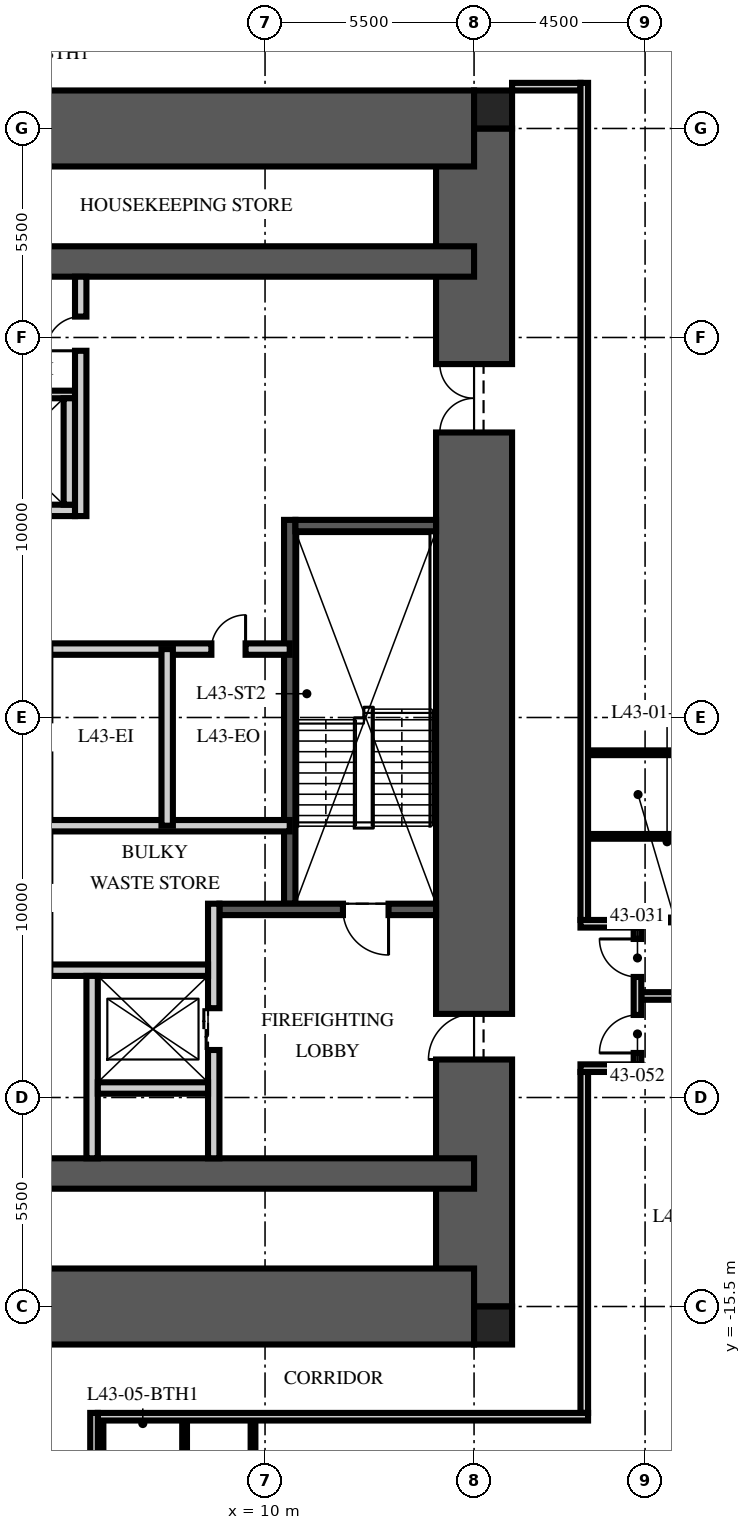
"""IFC4 building model, lengths in metres.
Left out: names, types, materials, properties, quantities, classifications, styles, units other than length and angle.
Written with IfcOpenShell. Run it as: python <this file> out.ifc"""

import sys

from ifc_helpers import new_model, si_unit, direction, frame, frame_2d, origin, origin_2d, place, context, subcontext, project, spatial, rectangle, extrude, element, fill, save


model = new_model("IFC4")
c1 = context("Model", 3, precision=1e-05, world=origin(), true_north=direction((0.0, 1.0)))
c2 = subcontext(c1, "Body", "Model", "MODEL_VIEW")
j1 = project(units=[si_unit("LENGTHUNIT", "METRE"), si_unit("PLANEANGLEUNIT", "RADIAN")], contexts=[c1])
p1 = place(None, origin())
s1 = spatial("IfcSite", under=j1, at=p1, CompositionType="ELEMENT")
p2 = place(p1, origin())
s2 = spatial("IfcBuilding", under=s1, at=p2, CompositionType="ELEMENT")
p3 = place(p2, frame((0.0, 0.0, 171.0)))
s3 = spatial("IfcBuildingStorey", under=s2, at=p3, CompositionType="ELEMENT", Elevation=171.0)
p4 = place(p3, frame((15.5, -15.5, -0.25), z_axis=(0.0, 0.0, 1.0), x_axis=(0.0, 1.0, 0.0)))
e1 = element("IfcWall", 1, at=p4, inside=s3, PredefinedType="SHEAR", context=c2, shape_type="SweptSolid", body=[
    extrude(rectangle(XDim=31.0, YDim=2.0, at=frame_2d((15.5, 0.0))), origin(), (0.0, 0.0, 1.0), 3.75),
])
p5 = place(p4, frame((6.5, 0.0, 0.25)))
e2 = element("IfcOpeningElement", 2, at=p5, cuts=e1, PredefinedType="OPENING", context=c2, shape_type="SweptSolid", body=[
    extrude(rectangle(XDim=1.2, YDim=2.1, at=frame_2d((0.6, 1.05))), frame((0.0, 1.01, 0.0), z_axis=(0.0, -1.0, 0.0), x_axis=(1.0, 0.0, 0.0)), (0.0, 0.0, 1.0), 2.02),
])
p6 = place(p4, frame((23.0, 0.0, 0.25)))
e3 = element("IfcOpeningElement", 3, at=p6, cuts=e1, PredefinedType="OPENING", context=c2, shape_type="SweptSolid", body=[
    extrude(rectangle(XDim=1.8, YDim=2.1, at=frame_2d((0.9, 1.05))), frame((0.0, 1.01, 0.0), z_axis=(0.0, -1.0, 0.0), x_axis=(1.0, 0.0, 0.0)), (0.0, 0.0, 1.0), 2.02),
])
p7 = place(p3, frame((-15.5, 15.5, -0.25), z_axis=(0.0, 0.0, 1.0), x_axis=(1.0, 0.0, 0.0)))
e4 = element("IfcWall", 4, at=p7, inside=s3, PredefinedType="SHEAR", context=c2, shape_type="SweptSolid", body=[
    extrude(rectangle(XDim=31.0, YDim=2.0, at=frame_2d((15.5, 0.0))), origin(), (0.0, 0.0, 1.0), 3.75),
])
p8 = place(p7, frame((5.0, 0.0, 0.25)))
e5 = element("IfcOpeningElement", 5, at=p8, cuts=e4, PredefinedType="OPENING", context=c2, shape_type="SweptSolid", body=[
    extrude(rectangle(XDim=1.0, YDim=2.1, at=frame_2d((0.5, 1.05))), frame((0.0, 1.01, 0.0), z_axis=(0.0, -1.0, 0.0), x_axis=(1.0, 0.0, 0.0)), (0.0, 0.0, 1.0), 2.02),
])
p9 = place(p3, frame((-15.5, -15.5, -0.25), z_axis=(0.0, 0.0, 1.0), x_axis=(1.0, 0.0, 0.0)))
e6 = element("IfcWall", 6, at=p9, inside=s3, PredefinedType="SHEAR", context=c2, shape_type="SweptSolid", body=[
    extrude(rectangle(XDim=31.0, YDim=2.0, at=frame_2d((15.5, 0.0))), origin(), (0.0, 0.0, 1.0), 3.75),
])
p10 = place(p9, frame((10.4, 0.0, 0.25)))
e7 = element("IfcOpeningElement", 7, at=p10, cuts=e6, PredefinedType="OPENING", context=c2, shape_type="SweptSolid", body=[
    extrude(rectangle(XDim=1.1, YDim=2.1, at=frame_2d((0.55, 1.05))), frame((0.0, 1.01, 0.0), z_axis=(0.0, -1.0, 0.0), x_axis=(1.0, 0.0, 0.0)), (0.0, 0.0, 1.0), 2.02),
])
p11 = place(p9, frame((13.5, 0.0, 0.25)))
e8 = element("IfcOpeningElement", 8, at=p11, cuts=e6, PredefinedType="OPENING", context=c2, shape_type="SweptSolid", body=[
    extrude(rectangle(XDim=1.1, YDim=2.1, at=frame_2d((0.55, 1.05))), frame((0.0, 1.01, 0.0), z_axis=(0.0, -1.0, 0.0), x_axis=(1.0, 0.0, 0.0)), (0.0, 0.0, 1.0), 2.02),
])
p12 = place(p9, frame((16.6, 0.0, 0.25)))
e9 = element("IfcOpeningElement", 9, at=p12, cuts=e6, PredefinedType="OPENING", context=c2, shape_type="SweptSolid", body=[
    extrude(rectangle(XDim=1.1, YDim=2.1, at=frame_2d((0.55, 1.05))), frame((0.0, 1.01, 0.0), z_axis=(0.0, -1.0, 0.0), x_axis=(1.0, 0.0, 0.0)), (0.0, 0.0, 1.0), 2.02),
])
for number, where, z_axis, x_axis in (
    (10, (-15.5, 12.0, -0.25), (0.0, 0.0, 1.0), (1.0, 0.0, 0.0)),
    (11, (-15.5, -12.0, -0.25), (0.0, 0.0, 1.0), (1.0, 0.0, 0.0)),
):
    element("IfcWall", number, at=place(p3, frame(where, z_axis=z_axis, x_axis=x_axis)), inside=s3, PredefinedType="SHEAR", context=c2, shape_type="SweptSolid", body=[
        extrude(rectangle(XDim=31.0, YDim=0.8, at=frame_2d((15.5, 0.0))), origin(), (0.0, 0.0, 1.0), 3.75),
    ])
for number, where, z_axis, x_axis in (
    (12, (16.0, 16.0, -0.25), (0.0, 0.0, 1.0), (1.0, 0.0, 0.0)),
    (13, (16.0, -16.0, -0.25), (0.0, 0.0, 1.0), (1.0, 0.0, 0.0)),
):
    element("IfcColumn", number, at=place(p3, frame(where, z_axis=z_axis, x_axis=x_axis)), inside=s3, PredefinedType="COLUMN", context=c2, shape_type="SweptSolid", body=[
        extrude(rectangle(XDim=1.0, YDim=1.0, at=origin_2d()), origin(), (0.0, 0.0, 1.0), 3.75),
    ])
p13 = place(p3, frame((10.65, -4.9, 0.0), z_axis=(0.0, 0.0, 1.0), x_axis=(0.0, 1.0, 0.0)))
e14 = element("IfcWall", 14, at=p13, inside=s3, PredefinedType="SOLIDWALL", context=c2, shape_type="SweptSolid", body=[
    extrude(rectangle(XDim=10.1, YDim=0.3, at=frame_2d((5.05, 0.0))), origin(), (0.0, 0.0, 1.0), 3.5),
])
p14 = place(p3, frame((14.5, -5.05, 0.0), z_axis=(0.0, 0.0, 1.0), x_axis=(-1.0, 0.0, 0.0)))
e15 = element("IfcWall", 15, at=p14, inside=s3, PredefinedType="SOLIDWALL", context=c2, shape_type="SweptSolid", body=[
    extrude(rectangle(XDim=5.7, YDim=0.3, at=frame_2d((2.85, 0.0))), origin(), (0.0, 0.0, 1.0), 3.5),
])
p15 = place(p14, frame((1.25, 0.0, 0.0)))
e16 = element("IfcOpeningElement", 16, at=p15, cuts=e15, PredefinedType="OPENING", context=c2, shape_type="SweptSolid", body=[
    extrude(rectangle(XDim=1.2, YDim=2.1, at=frame_2d((0.6, 1.05))), frame((0.0, 0.16, 0.0), z_axis=(0.0, -1.0, 0.0), x_axis=(1.0, 0.0, 0.0)), (0.0, 0.0, 1.0), 0.32),
])
p16 = place(p3, frame((14.5, 5.05, 0.0), z_axis=(0.0, 0.0, 1.0), x_axis=(-1.0, 0.0, 0.0)))
e17 = element("IfcWall", 17, at=p16, inside=s3, PredefinedType="SOLIDWALL", context=c2, shape_type="SweptSolid", body=[
    extrude(rectangle(XDim=3.7, YDim=0.3, at=frame_2d((1.85, 0.0))), origin(), (0.0, 0.0, 1.0), 3.5),
])
p17 = place(p3, frame((8.65, -11.6, 0.0), z_axis=(0.0, 0.0, 1.0), x_axis=(0.0, 1.0, 0.0)))
e18 = element("IfcWall", 18, at=p17, inside=s3, PredefinedType="PARTITIONING", context=c2, shape_type="SweptSolid", body=[
    extrude(rectangle(XDim=6.7, YDim=0.3, at=frame_2d((3.35, 0.0))), origin(), (0.0, 0.0, 1.0), 3.5),
])
p18 = place(p17, frame((2.85, 0.0, 0.0)))
e19 = element("IfcOpeningElement", 19, at=p18, cuts=e18, PredefinedType="OPENING", context=c2, shape_type="SweptSolid", body=[
    extrude(rectangle(XDim=1.1, YDim=2.1, at=frame_2d((0.55, 1.05))), frame((0.0, 0.16, 0.0), z_axis=(0.0, -1.0, 0.0), x_axis=(1.0, 0.0, 0.0)), (0.0, 0.0, 1.0), 0.32),
])
p19 = place(p3, frame((-8.5, -6.65, 0.0), z_axis=(0.0, 0.0, 1.0), x_axis=(1.0, 0.0, 0.0)))
e20 = element("IfcWall", 20, at=p19, inside=s3, PredefinedType="PARTITIONING", context=c2, shape_type="SweptSolid", body=[
    extrude(rectangle(XDim=17.0, YDim=0.3, at=frame_2d((8.5, 0.0))), origin(), (0.0, 0.0, 1.0), 3.5),
])
p20 = place(p19, frame((7.8, 0.0, 0.0)))
e21 = element("IfcOpeningElement", 21, at=p20, cuts=e20, PredefinedType="OPENING", context=c2, shape_type="SweptSolid", body=[
    extrude(rectangle(XDim=1.3, YDim=2.4, at=frame_2d((0.65, 1.2))), frame((0.0, 0.16, 0.0), z_axis=(0.0, -1.0, 0.0), x_axis=(1.0, 0.0, 0.0)), (0.0, 0.0, 1.0), 0.32),
])
p21 = place(p19, frame((5.65, 0.0, 0.0)))
e22 = element("IfcOpeningElement", 22, at=p21, cuts=e20, PredefinedType="OPENING", context=c2, shape_type="SweptSolid", body=[
    extrude(rectangle(XDim=0.9, YDim=2.1, at=frame_2d((0.45, 1.05))), frame((0.0, 0.16, 0.0), z_axis=(0.0, -1.0, 0.0), x_axis=(1.0, 0.0, 0.0)), (0.0, 0.0, 1.0), 0.32),
])
p22 = place(p19, frame((10.4, 0.0, 0.0)))
e23 = element("IfcOpeningElement", 23, at=p22, cuts=e20, PredefinedType="OPENING", context=c2, shape_type="SweptSolid", body=[
    extrude(rectangle(XDim=0.9, YDim=2.1, at=frame_2d((0.45, 1.05))), frame((0.0, 0.16, 0.0), z_axis=(0.0, -1.0, 0.0), x_axis=(1.0, 0.0, 0.0)), (0.0, 0.0, 1.0), 0.32),
])
p23 = place(p3, frame((5.45, -11.6, 0.0), z_axis=(0.0, 0.0, 1.0), x_axis=(0.0, 1.0, 0.0)))
e24 = element("IfcWall", 24, at=p23, inside=s3, PredefinedType="PARTITIONING", context=c2, shape_type="SweptSolid", body=[
    extrude(rectangle(XDim=4.8, YDim=0.3, at=frame_2d((2.4, 0.0))), origin(), (0.0, 0.0, 1.0), 3.5),
])
p24 = place(p3, frame((5.6, -9.75, 0.0), z_axis=(0.0, 0.0, 1.0), x_axis=(1.0, 0.0, 0.0)))
e25 = element("IfcWall", 25, at=p24, inside=s3, PredefinedType="PARTITIONING", context=c2, shape_type="SweptSolid", body=[
    extrude(rectangle(XDim=2.9, YDim=0.3, at=frame_2d((1.45, 0.0))), origin(), (0.0, 0.0, 1.0), 3.5),
])
p25 = place(p3, frame((-4.7, 5.45, 0.0), z_axis=(0.0, 0.0, 1.0), x_axis=(1.0, 0.0, 0.0)))
e26 = element("IfcWall", 26, at=p25, inside=s3, PredefinedType="PARTITIONING", context=c2, shape_type="SweptSolid", body=[
    extrude(rectangle(XDim=9.7, YDim=0.3, at=frame_2d((4.85, 0.0))), origin(), (0.0, 0.0, 1.0), 3.5),
])
p26 = place(p3, frame((-4.7, 8.5, 0.0), z_axis=(0.0, 0.0, 1.0), x_axis=(1.0, 0.0, 0.0)))
e27 = element("IfcWall", 27, at=p26, inside=s3, PredefinedType="PARTITIONING", context=c2, shape_type="SweptSolid", body=[
    extrude(rectangle(XDim=9.7, YDim=0.2, at=frame_2d((4.85, 0.0))), origin(), (0.0, 0.0, 1.0), 3.5),
])
p27 = place(p3, frame((4.85, 5.6, 0.0), z_axis=(0.0, 0.0, 1.0), x_axis=(0.0, 1.0, 0.0)))
e28 = element("IfcWall", 28, at=p27, inside=s3, PredefinedType="PARTITIONING", context=c2, shape_type="SweptSolid", body=[
    extrude(rectangle(XDim=2.8, YDim=0.3, at=frame_2d((1.4, 0.0))), origin(), (0.0, 0.0, 1.0), 3.5),
])
p28 = place(p3, frame((-10.65, 1.8, 0.0), z_axis=(0.0, 0.0, 1.0), x_axis=(1.0, 0.0, 0.0)))
e29 = element("IfcWall", 29, at=p28, inside=s3, PredefinedType="PARTITIONING", context=c2, shape_type="SweptSolid", body=[
    extrude(rectangle(XDim=21.3, YDim=0.3, at=frame_2d((10.65, 0.0))), origin(), (0.0, 0.0, 1.0), 3.5),
])
p29 = place(p28, frame((10.05, 0.0, 0.0)))
e30 = element("IfcOpeningElement", 30, at=p29, cuts=e29, PredefinedType="OPENING", context=c2, shape_type="SweptSolid", body=[
    extrude(rectangle(XDim=1.2, YDim=2.1, at=frame_2d((0.6, 1.05))), frame((0.0, 0.16, 0.0), z_axis=(0.0, -1.0, 0.0), x_axis=(1.0, 0.0, 0.0)), (0.0, 0.0, 1.0), 0.32),
])
p30 = place(p28, frame((19.238, 0.0, 0.0)))
e31 = element("IfcOpeningElement", 31, at=p30, cuts=e29, PredefinedType="OPENING", context=c2, shape_type="SweptSolid", body=[
    extrude(rectangle(XDim=0.9, YDim=2.1, at=frame_2d((0.45, 1.05))), frame((0.0, 0.16, 0.0), z_axis=(0.0, -1.0, 0.0), x_axis=(1.0, 0.0, 0.0)), (0.0, 0.0, 1.0), 0.32),
])
p31 = place(p3, frame((10.65, -2.848, 0.0), z_axis=(0.0, 0.0, 1.0), x_axis=(-1.0, 0.0, 0.0)))
e32 = element("IfcWall", 32, at=p31, inside=s3, PredefinedType="PARTITIONING", context=c2, shape_type="SweptSolid", body=[
    extrude(rectangle(XDim=6.45, YDim=0.3, at=frame_2d((3.225, 0.0))), origin(), (0.0, 0.0, 1.0), 3.5),
])
p32 = place(p3, frame((7.425, -2.848, 0.0), z_axis=(0.0, 0.0, 1.0), x_axis=(0.0, 1.0, 0.0)))
e33 = element("IfcWall", 33, at=p32, inside=s3, PredefinedType="PARTITIONING", context=c2, shape_type="SweptSolid", body=[
    extrude(rectangle(XDim=4.648, YDim=0.3, at=frame_2d((2.324, 0.0))), origin(), (0.0, 0.0, 1.0), 3.5),
])
p33 = place(p3, frame((5.15, 5.3, 0.0), z_axis=(0.0, 0.0, 1.0), x_axis=(0.0, 1.0, 0.0)))
e34 = element("IfcWall", 34, at=p33, inside=s3, PredefinedType="PARTITIONING", context=c2, shape_type="SweptSolid", body=[
    extrude(rectangle(XDim=6.3, YDim=0.3, at=frame_2d((3.15, 0.0))), origin(), (0.0, 0.0, 1.0), 3.5),
])
p34 = place(p33, frame((4.35, 0.0, 0.0)))
e35 = element("IfcOpeningElement", 35, at=p34, cuts=e34, PredefinedType="OPENING", context=c2, shape_type="SweptSolid", body=[
    extrude(rectangle(XDim=0.9, YDim=2.1, at=frame_2d((0.45, 1.05))), frame((0.0, 0.16, 0.0), z_axis=(0.0, -1.0, 0.0), x_axis=(1.0, 0.0, 0.0)), (0.0, 0.0, 1.0), 0.32),
])
p35 = place(p3, frame((16.5, 16.6, 0.0), z_axis=(0.0, 0.0, 1.0), x_axis=(1.0, 0.0, 0.0)))
e36 = element("IfcWall", 36, at=p35, inside=s3, PredefinedType="PARTITIONING", context=c2, shape_type="SweptSolid", body=[
    extrude(rectangle(XDim=1.8, YDim=0.2, at=frame_2d((0.9, 0.0))), origin(), (0.0, 0.0, 1.0), 2.3),
])
p36 = place(p3, frame((19.9, -7.328, 0.0), z_axis=(0.0, 0.0, 1.0), x_axis=(1.0, 0.0, 0.0)))
e37 = element("IfcWall", 37, at=p36, inside=s3, PredefinedType="PARTITIONING", context=c2, shape_type="SweptSolid", body=[
    extrude(rectangle(XDim=8.25, YDim=0.2, at=frame_2d((4.125, 0.0))), origin(), (0.0, 0.0, 1.0), 2.81),
])
p37 = place(p3, frame((19.97, -5.328, 0.0), z_axis=(0.0, 0.0, 1.0), x_axis=(1.0, 0.0, 0.0)))
e38 = element("IfcWall", 38, at=p37, inside=s3, PredefinedType="PARTITIONING", context=c2, shape_type="SweptSolid", body=[
    extrude(rectangle(XDim=2.06, YDim=0.125, at=frame_2d((1.03, 0.0))), origin(), (0.0, 0.0, 1.0), 3.5),
])
for number, where, z_axis, x_axis in (
    (39, (18.5, -3.128, 0.0), (0.0, 0.0, 1.0), (1.0, 0.0, 0.0)),
    (40, (18.5, -0.928, 0.0), (0.0, 0.0, 1.0), (1.0, 0.0, 0.0)),
):
    element("IfcWall", number, at=place(p3, frame(where, z_axis=z_axis, x_axis=x_axis)), inside=s3, PredefinedType="PARTITIONING", context=c2, shape_type="SweptSolid", body=[
        extrude(rectangle(XDim=3.53, YDim=0.125, at=frame_2d((1.765, 0.0))), origin(), (0.0, 0.0, 1.0), 3.5),
    ])
for number, where, z_axis, x_axis in (
    (41, (5.684, -18.5, 0.0), (0.0, 0.0, 1.0), (0.0, -1.0, 0.0)),
    (42, (7.884, -18.5, 0.0), (0.0, 0.0, 1.0), (0.0, -1.0, 0.0)),
    (43, (9.684, -18.5, 0.0), (0.0, 0.0, 1.0), (0.0, -1.0, 0.0)),
):
    element("IfcWall", number, at=place(p3, frame(where, z_axis=z_axis, x_axis=x_axis)), inside=s3, PredefinedType="PARTITIONING", context=c2, shape_type="SweptSolid", body=[
        extrude(rectangle(XDim=3.95, YDim=0.125, at=frame_2d((1.975, 0.0))), origin(), (0.0, 0.0, 1.0), 3.5),
    ])
p38 = place(p3, frame((18.4, -18.3, 0.0), z_axis=(0.0, 0.0, 1.0), x_axis=(0.0, 1.0, 0.0)))
e44 = element("IfcWall", 44, at=p38, inside=s3, PredefinedType="PARTITIONING", context=c2, shape_type="SweptSolid", body=[
    extrude(rectangle(XDim=8.972, YDim=0.2, at=frame_2d((4.486, 0.0))), origin(), (0.0, 0.0, 1.0), 2.3),
])
p39 = place(p3, frame((18.3, -9.228, 0.0), z_axis=(0.0, 0.0, 1.0), x_axis=(1.0, 0.0, 0.0)))
e45 = element("IfcWall", 45, at=p39, inside=s3, PredefinedType="PARTITIONING", context=c2, shape_type="SweptSolid", body=[
    extrude(rectangle(XDim=1.6, YDim=0.2, at=frame_2d((0.8, 0.0))), origin(), (0.0, 0.0, 1.0), 2.7),
])
p40 = place(p3, frame((18.3, -5.428, 0.0), z_axis=(0.0, 0.0, 1.0), x_axis=(1.0, 0.0, 0.0)))
e46 = element("IfcWall", 46, at=p40, inside=s3, PredefinedType="PARTITIONING", context=c2, shape_type="SweptSolid", body=[
    extrude(rectangle(XDim=1.6, YDim=0.2, at=frame_2d((0.8, 0.0))), origin(), (0.0, 0.0, 1.0), 3.5),
])
p41 = place(p3, frame((19.8, -9.128, 0.0), z_axis=(0.0, 0.0, 1.0), x_axis=(0.0, 1.0, 0.0)))
e47 = element("IfcWall", 47, at=p41, inside=s3, PredefinedType="PARTITIONING", context=c2, shape_type="SweptSolid", body=[
    extrude(rectangle(XDim=3.6, YDim=0.2, at=frame_2d((1.8, 0.0))), origin(), (0.0, 0.0, 1.0), 2.7),
])
p42 = place(p41, frame((2.3, 0.0, 0.0)))
e48 = element("IfcOpeningElement", 48, at=p42, cuts=e47, PredefinedType="OPENING", context=c2, shape_type="SweptSolid", body=[
    extrude(rectangle(XDim=1.0, YDim=2.2, at=frame_2d((0.5, 1.1))), frame((0.0, 0.11, 0.0), z_axis=(0.0, -1.0, 0.0), x_axis=(1.0, 0.0, 0.0)), (0.0, 0.0, 1.0), 0.22),
])
p43 = place(p41, frame((0.3, 0.0, 0.0)))
e49 = element("IfcOpeningElement", 49, at=p43, cuts=e47, PredefinedType="OPENING", context=c2, shape_type="SweptSolid", body=[
    extrude(rectangle(XDim=1.0, YDim=2.2, at=frame_2d((0.5, 1.1))), frame((0.0, 0.11, 0.0), z_axis=(0.0, -1.0, 0.0), x_axis=(1.0, 0.0, 0.0)), (0.0, 0.0, 1.0), 0.22),
])
p44 = place(p3, frame((18.4, -5.328, 0.0), z_axis=(0.0, 0.0, 1.0), x_axis=(0.0, 1.0, 0.0)))
e50 = element("IfcWall", 50, at=p44, inside=s3, PredefinedType="PARTITIONING", context=c2, shape_type="SweptSolid", body=[
    extrude(rectangle(XDim=22.028, YDim=0.2, at=frame_2d((11.014, 0.0))), origin(), (0.0, 0.0, 1.0), 2.7),
])
p45 = place(p3, frame((18.5, -18.4, 0.0), z_axis=(0.0, 0.0, 1.0), x_axis=(-1.0, 0.0, 0.0)))
e51 = element("IfcWall", 51, at=p45, inside=s3, PredefinedType="PARTITIONING", context=c2, shape_type="SweptSolid", body=[
    extrude(rectangle(XDim=12.9, YDim=0.2, at=frame_2d((6.45, 0.0))), origin(), (0.0, 0.0, 1.0), 2.3),
])
p46 = place(p3, frame((5.5, -18.3, 0.0), z_axis=(0.0, 0.0, 1.0), x_axis=(0.0, -1.0, 0.0)))
e52 = element("IfcWall", 52, at=p46, inside=s3, PredefinedType="PARTITIONING", context=c2, shape_type="SweptSolid", body=[
    extrude(rectangle(XDim=3.0, YDim=0.2, at=frame_2d((1.5, 0.0))), origin(), (0.0, 0.0, 1.0), 3.5),
])
p47 = place(p15, origin())
e53 = element("IfcDoor", 53, at=p47, inside=s3, OperationType="SINGLE_SWING_LEFT", PredefinedType="DOOR", context=c2, shape_type="SweptSolid", body=[
    extrude(rectangle(XDim=1.2, YDim=2.1, at=frame_2d((0.6, 1.05))), frame((0.0, 0.025, 0.0), z_axis=(0.0, -1.0, 0.0), x_axis=(1.0, 0.0, 0.0)), (0.0, 0.0, 1.0), 0.05),
])
fill(e16, e53)
p48 = place(p5, origin())
e54 = element("IfcDoor", 54, at=p48, inside=s3, OperationType="SINGLE_SWING_LEFT", PredefinedType="DOOR", context=c2, shape_type="SweptSolid", body=[
    extrude(rectangle(XDim=1.2, YDim=2.1, at=frame_2d((0.6, 1.05))), frame((0.0, 0.025, 0.0), z_axis=(0.0, -1.0, 0.0), x_axis=(1.0, 0.0, 0.0)), (0.0, 0.0, 1.0), 0.05),
])
fill(e2, e54)
p49 = place(p6, origin())
e55 = element("IfcDoor", 55, at=p49, inside=s3, OperationType="DOUBLE_DOOR_SINGLE_SWING", PredefinedType="DOOR", context=c2, shape_type="SweptSolid", body=[
    extrude(rectangle(XDim=1.8, YDim=2.1, at=frame_2d((0.9, 1.05))), frame((0.0, 0.025, 0.0), z_axis=(0.0, -1.0, 0.0), x_axis=(1.0, 0.0, 0.0)), (0.0, 0.0, 1.0), 0.05),
])
fill(e3, e55)
p50 = place(p18, origin())
e56 = element("IfcDoor", 56, at=p50, inside=s3, OperationType="DOUBLE_DOOR_SLIDING", PredefinedType="DOOR", context=c2, shape_type="SweptSolid", body=[
    extrude(rectangle(XDim=1.1, YDim=2.1, at=frame_2d((0.55, 1.05))), frame((0.0, 0.025, 0.0), z_axis=(0.0, -1.0, 0.0), x_axis=(1.0, 0.0, 0.0)), (0.0, 0.0, 1.0), 0.05),
])
fill(e19, e56)
p51 = place(p30, origin())
e57 = element("IfcDoor", 57, at=p51, inside=s3, OperationType="SINGLE_SWING_RIGHT", PredefinedType="DOOR", context=c2, shape_type="SweptSolid", body=[
    extrude(rectangle(XDim=0.9, YDim=2.1, at=frame_2d((0.45, 1.05))), frame((0.0, 0.025, 0.0), z_axis=(0.0, -1.0, 0.0), x_axis=(1.0, 0.0, 0.0)), (0.0, 0.0, 1.0), 0.05),
])
fill(e31, e57)
p52 = place(p34, origin())
e58 = element("IfcDoor", 58, at=p52, inside=s3, OperationType="SINGLE_SWING_LEFT", PredefinedType="DOOR", context=c2, shape_type="SweptSolid", body=[
    extrude(rectangle(XDim=0.9, YDim=2.1, at=frame_2d((0.45, 1.05))), frame((0.0, 0.025, 0.0), z_axis=(0.0, -1.0, 0.0), x_axis=(1.0, 0.0, 0.0)), (0.0, 0.0, 1.0), 0.05),
])
fill(e35, e58)
p53 = place(p42, origin())
e59 = element("IfcDoor", 59, at=p53, inside=s3, OperationType="SINGLE_SWING_RIGHT", PredefinedType="DOOR", context=c2, shape_type="SweptSolid", body=[
    extrude(rectangle(XDim=1.0, YDim=2.2, at=frame_2d((0.5, 1.1))), frame((0.0, 0.025, 0.0), z_axis=(0.0, -1.0, 0.0), x_axis=(1.0, 0.0, 0.0)), (0.0, 0.0, 1.0), 0.05),
])
fill(e48, e59)
p54 = place(p43, origin())
e60 = element("IfcDoor", 60, at=p54, inside=s3, OperationType="SINGLE_SWING_LEFT", PredefinedType="DOOR", context=c2, shape_type="SweptSolid", body=[
    extrude(rectangle(XDim=1.0, YDim=2.2, at=frame_2d((0.5, 1.1))), frame((0.0, 0.025, 0.0), z_axis=(0.0, -1.0, 0.0), x_axis=(1.0, 0.0, 0.0)), (0.0, 0.0, 1.0), 0.05),
])
fill(e49, e60)
save(model, sys.argv[1])
